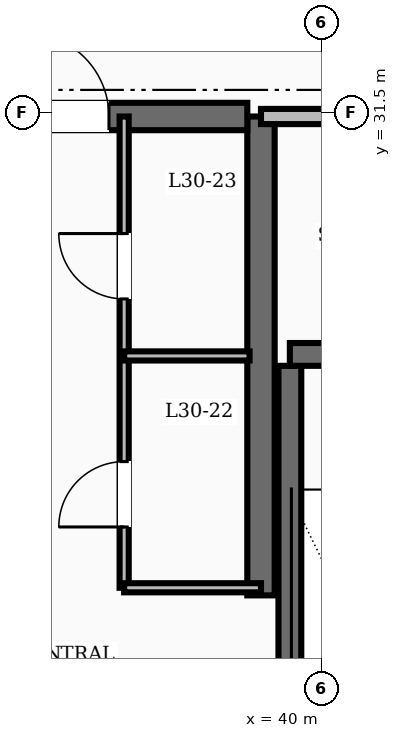
"""IFC4 building model, lengths in metres.
Left out: names, types, materials, properties, quantities, classifications, styles, units other than length and angle.
Written with IfcOpenShell. Run it as: python <this file> out.ifc"""

import sys

from ifc_helpers import new_model, si_unit, direction, frame, frame_2d, origin, place, context, subcontext, project, spatial, rectangle, extrude, element, fill, save


model = new_model("IFC4")
c1 = context("Model", 3, precision=1e-05, world=origin(), true_north=direction((0.0, 1.0)))
c2 = subcontext(c1, "Body", "Model", "MODEL_VIEW")
j1 = project(units=[si_unit("LENGTHUNIT", "METRE"), si_unit("PLANEANGLEUNIT", "RADIAN")], contexts=[c1])
p1 = place(None, origin())
s1 = spatial("IfcSite", under=j1, at=p1, CompositionType="ELEMENT")
p2 = place(p1, origin())
s2 = spatial("IfcBuilding", under=s1, at=p2, CompositionType="ELEMENT")
p3 = place(p2, frame((0.0, 0.0, 120.8)))
s3 = spatial("IfcBuildingStorey", under=s2, at=p3, CompositionType="ELEMENT", Elevation=120.8)
p4 = place(p3, frame((39.2, 25.15, 0.0), z_axis=(0.0, 0.0, 1.0), x_axis=(0.0, 1.0, 0.0)))
e1 = element("IfcWall", 1, at=p4, inside=s3, PredefinedType="SHEAR", context=c2, shape_type="SweptSolid", body=[
    extrude(rectangle(XDim=6.3, YDim=0.36, at=frame_2d((3.15, 0.0))), origin(), (0.0, 0.0, 1.0), 3.6),
])
p5 = place(p3, frame((35.8, 31.45, 0.0), z_axis=(0.0, 0.0, 1.0), x_axis=(1.0, 0.0, 0.0)))
e2 = element("IfcWall", 2, at=p5, inside=s3, PredefinedType="SHEAR", context=c2, shape_type="SweptSolid", body=[
    extrude(rectangle(XDim=3.22, YDim=0.36, at=frame_2d((1.61, 0.0))), origin(), (0.0, 0.0, 1.0), 3.6),
])
p6 = place(p5, frame((0.3, 0.0, 0.0)))
e3 = element("IfcOpeningElement", 3, at=p6, cuts=e2, PredefinedType="OPENING", context=c2, shape_type="SweptSolid", body=[
    extrude(rectangle(XDim=1.1, YDim=2.1, at=frame_2d((0.55, 1.05))), frame((0.0, 0.19, 0.0), z_axis=(0.0, -1.0, 0.0), x_axis=(1.0, 0.0, 0.0)), (0.0, 0.0, 1.0), 0.38),
])
p7 = place(p3, frame((39.58, 19.43, 0.0), z_axis=(0.0, 0.0, 1.0), x_axis=(0.0, 1.0, 0.0)))
e4 = element("IfcWall", 4, at=p7, inside=s3, PredefinedType="SHEAR", context=c2, shape_type="SweptSolid", body=[
    extrude(rectangle(XDim=8.74, YDim=0.3, at=frame_2d((4.37, 0.0))), origin(), (0.0, 0.0, 1.0), 3.6),
])
p8 = place(p3, frame((39.58, 28.32, 0.0), z_axis=(0.0, 0.0, 1.0), x_axis=(1.0, 0.0, 0.0)))
e5 = element("IfcWall", 5, at=p8, inside=s3, PredefinedType="SHEAR", context=c2, shape_type="SweptSolid", body=[
    extrude(rectangle(XDim=3.6, YDim=0.3, at=frame_2d((1.8, 0.0))), origin(), (0.0, 0.0, 1.0), 3.6),
])
p9 = place(p8, frame((1.3, 0.0, 0.0)))
e6 = element("IfcOpeningElement", 6, at=p9, cuts=e5, PredefinedType="OPENING", context=c2, shape_type="SweptSolid", body=[
    extrude(rectangle(XDim=1.1, YDim=2.1, at=frame_2d((0.55, 1.05))), frame((0.0, 0.16, 0.0), z_axis=(0.0, -1.0, 0.0), x_axis=(1.0, 0.0, 0.0)), (0.0, 0.0, 1.0), 0.32),
])
p10 = place(p3, frame((39.2, 31.45, 0.0), z_axis=(0.0, 0.0, 1.0), x_axis=(1.0, 0.0, 0.0)))
e7 = element("IfcWall", 7, at=p10, inside=s3, PredefinedType="SOLIDWALL", context=c2, shape_type="SweptSolid", body=[
    extrude(rectangle(XDim=3.98, YDim=0.2, at=frame_2d((1.99, 0.0))), origin(), (0.0, 0.0, 1.0), 2.8),
])
p11 = place(p3, frame((37.4, 25.25, 0.0), z_axis=(0.0, 0.0, 1.0), x_axis=(0.0, 1.0, 0.0)))
e8 = element("IfcWall", 8, at=p11, inside=s3, PredefinedType="PARTITIONING", context=c2, shape_type="SweptSolid", body=[
    extrude(rectangle(XDim=6.2, YDim=0.12, at=frame_2d((3.1, 0.0))), origin(), (0.0, 0.0, 1.0), 2.8),
])
p12 = place(p11, frame((0.8, 0.0, 0.0)))
e9 = element("IfcOpeningElement", 9, at=p12, cuts=e8, PredefinedType="OPENING", context=c2, shape_type="SweptSolid", body=[
    extrude(rectangle(XDim=0.86, YDim=2.1, at=frame_2d((0.43, 1.05))), frame((0.0, 0.07, 0.0), z_axis=(0.0, -1.0, 0.0), x_axis=(1.0, 0.0, 0.0)), (0.0, 0.0, 1.0), 0.14),
])
p13 = place(p11, frame((3.8, 0.0, 0.0)))
e10 = element("IfcOpeningElement", 10, at=p13, cuts=e8, PredefinedType="OPENING", context=c2, shape_type="SweptSolid", body=[
    extrude(rectangle(XDim=0.86, YDim=2.1, at=frame_2d((0.43, 1.05))), frame((0.0, 0.07, 0.0), z_axis=(0.0, -1.0, 0.0), x_axis=(1.0, 0.0, 0.0)), (0.0, 0.0, 1.0), 0.14),
])
p14 = place(p3, frame((37.4, 25.25, 0.0), z_axis=(0.0, 0.0, 1.0), x_axis=(1.0, 0.0, 0.0)))
e11 = element("IfcWall", 11, at=p14, inside=s3, PredefinedType="PARTITIONING", context=c2, shape_type="SweptSolid", body=[
    extrude(rectangle(XDim=1.8, YDim=0.12, at=frame_2d((0.9, 0.0))), origin(), (0.0, 0.0, 1.0), 2.8),
])
p15 = place(p3, frame((37.4, 28.3, 0.0), z_axis=(0.0, 0.0, 1.0), x_axis=(1.0, 0.0, 0.0)))
e12 = element("IfcWall", 12, at=p15, inside=s3, PredefinedType="PARTITIONING", context=c2, shape_type="SweptSolid", body=[
    extrude(rectangle(XDim=1.65, YDim=0.12, at=frame_2d((0.825, 0.0))), origin(), (0.0, 0.0, 1.0), 2.8),
])
p16 = place(p6, origin())
e13 = element("IfcDoor", 13, at=p16, inside=s3, OperationType="SINGLE_SWING_LEFT", PredefinedType="DOOR", context=c2, shape_type="SweptSolid", body=[
    extrude(rectangle(XDim=1.1, YDim=2.1, at=frame_2d((0.55, 1.05))), frame((0.0, 0.025, 0.0), z_axis=(0.0, -1.0, 0.0), x_axis=(1.0, 0.0, 0.0)), (0.0, 0.0, 1.0), 0.05),
])
fill(e3, e13)
p17 = place(p12, origin())
e14 = element("IfcDoor", 14, at=p17, inside=s3, OperationType="SINGLE_SWING_LEFT", PredefinedType="DOOR", context=c2, shape_type="SweptSolid", body=[
    extrude(rectangle(XDim=0.86, YDim=2.1, at=frame_2d((0.43, 1.05))), frame((0.0, 0.025, 0.0), z_axis=(0.0, -1.0, 0.0), x_axis=(1.0, 0.0, 0.0)), (0.0, 0.0, 1.0), 0.05),
])
fill(e9, e14)
p18 = place(p13, origin())
e15 = element("IfcDoor", 15, at=p18, inside=s3, OperationType="SINGLE_SWING_RIGHT", PredefinedType="DOOR", context=c2, shape_type="SweptSolid", body=[
    extrude(rectangle(XDim=0.86, YDim=2.1, at=frame_2d((0.43, 1.05))), frame((0.0, 0.025, 0.0), z_axis=(0.0, -1.0, 0.0), x_axis=(1.0, 0.0, 0.0)), (0.0, 0.0, 1.0), 0.05),
])
fill(e10, e15)
save(model, sys.argv[1])
